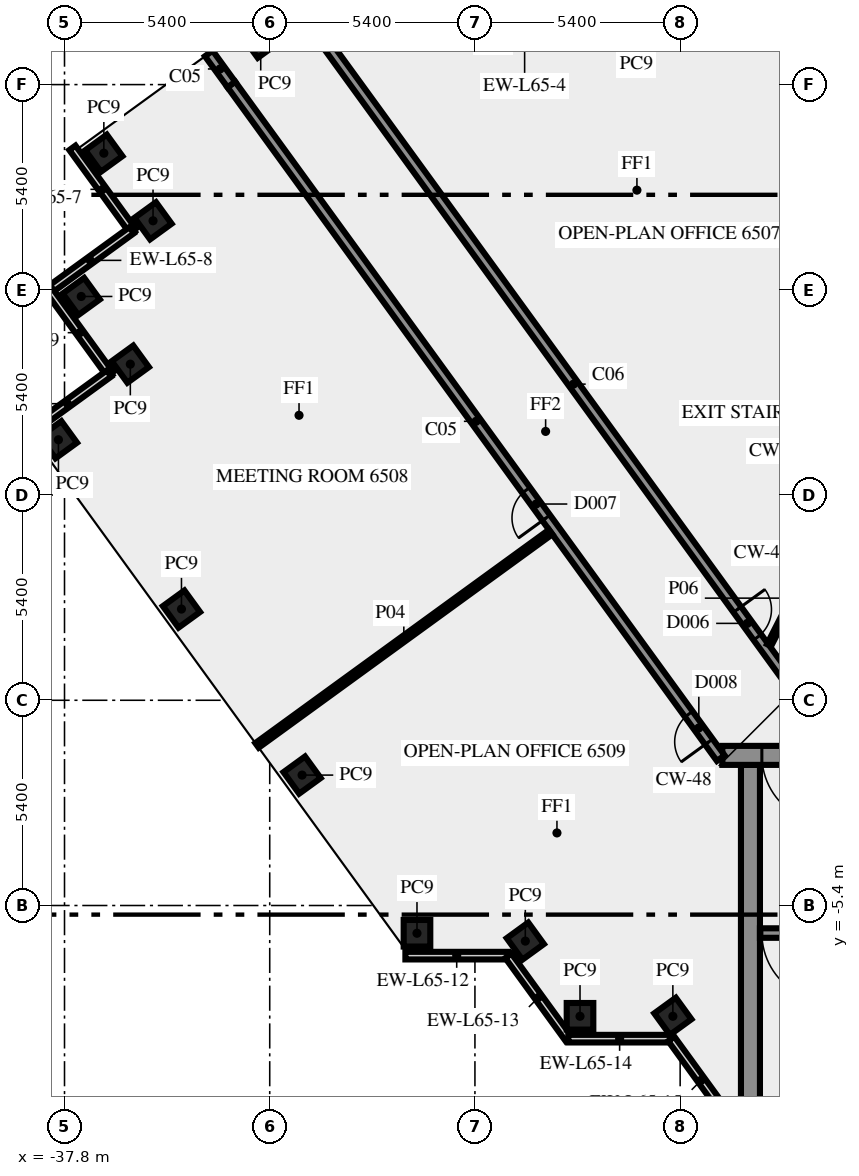
"""IFC4 building model, lengths in metres.
Left out: names, types, materials, properties, quantities, classifications, styles, units other than length and angle.
Written with IfcOpenShell. Run it as: python <this file> out.ifc"""

import sys

from ifc_helpers import new_model, si_unit, direction, frame, frame_2d, origin, origin_2d, place, context, subcontext, project, spatial, rectangle, extrude, element, fill, save


model = new_model("IFC4")
c1 = context("Model", 3, precision=1e-05, world=origin(), true_north=direction((0.0, 1.0)))
c2 = subcontext(c1, "Body", "Model", "MODEL_VIEW")
j1 = project(units=[si_unit("LENGTHUNIT", "METRE"), si_unit("PLANEANGLEUNIT", "RADIAN")], contexts=[c1])
p1 = place(None, origin())
s1 = spatial("IfcSite", under=j1, at=p1, CompositionType="ELEMENT")
p2 = place(p1, origin())
s2 = spatial("IfcBuilding", under=s1, at=p2, CompositionType="ELEMENT")
p3 = place(p2, frame((0.0, 0.0, 281.0)))
s3 = spatial("IfcBuildingStorey", under=s2, at=p3, CompositionType="ELEMENT", Elevation=281.0)
for number, where, z_axis, x_axis in (
    (1, (-32.637, 17.393, 0.0), (0.0, 0.0, 1.0), (-0.809, -0.588, 0.0)),
    (2, (-36.765, 14.395, 0.0), (0.0, 0.0, 1.0), (0.588, -0.809, 0.0)),
    (3, (-35.471, 12.616, 0.0), (0.0, 0.0, 1.0), (-0.809, -0.588, 0.0)),
    (4, (-37.36, 10.625, 0.0), (0.0, 0.0, 1.0), (0.588, -0.809, 0.0)),
    (5, (-36.068, 8.844, 0.0), (0.0, 0.0, 1.0), (0.588, -0.809, 0.0)),
    (6, (-37.96, 6.855, 0.0), (0.0, 0.0, 1.0), (0.588, -0.809, 0.0)),
    (7, (-34.722, 2.4, 0.0), (0.0, 0.0, 1.0), (0.588, -0.809, 0.0)),
    (8, (-31.548, -1.969, 0.0), (0.0, 0.0, 1.0), (0.588, -0.809, 0.0)),
    (9, (-28.525, -6.13, 0.0), (0.0, 0.0, 1.0), (1.0, 0.0, 0.0)),
    (10, (-25.674, -6.337, 0.0), (0.0, 0.0, 1.0), (0.588, -0.809, 0.0)),
    (11, (-24.235, -8.315, 0.0), (0.0, 0.0, 1.0), (1.0, 0.0, 0.0)),
    (12, (-21.792, -8.315, 0.0), (0.0, 0.0, 1.0), (0.588, -0.809, 0.0)),
):
    element("IfcColumn", number, at=place(p3, frame(where, z_axis=z_axis, x_axis=x_axis)), inside=s3, PredefinedType="COLUMN", context=c2, shape_type="SweptSolid", body=[
        extrude(rectangle(XDim=0.7, YDim=0.7, at=origin_2d()), origin(), (0.0, 0.0, 1.0), 3.65),
    ])
for number, where, z_axis, x_axis in (
    (13, (-37.592, 14.536, 0.0), (0.0, 0.0, 1.0), (0.588, -0.809, 0.0)),
    (14, (-36.032, 12.369, 0.0), (0.0, 0.0, 1.0), (-0.809, -0.588, 0.0)),
    (15, (-38.189, 10.765, 0.0), (0.0, 0.0, 1.0), (0.588, -0.809, 0.0)),
    (16, (-36.629, 8.597, 0.0), (0.0, 0.0, 1.0), (-0.809, -0.588, 0.0)),
    (17, (-28.83, -6.719, 0.0), (0.0, 0.0, 1.0), (1.0, 0.0, 0.0)),
):
    element("IfcWall", number, at=place(p3, frame(where, z_axis=z_axis, x_axis=x_axis)), inside=s3, PredefinedType="SOLIDWALL", context=c2, shape_type="SweptSolid", body=[
        extrude(rectangle(XDim=2.7, YDim=0.2, at=frame_2d((1.35, 0.0))), origin(), (0.0, 0.0, 1.0), 3.65),
    ])
p4 = place(p3, frame((-26.12, -6.724, 0.0), z_axis=(0.0, 0.0, 1.0), x_axis=(0.587720002413, -0.809064397168, 0.0)))
e18 = element("IfcWall", 18, at=p4, inside=s3, PredefinedType="SOLIDWALL", context=c2, shape_type="SweptSolid", body=[
    extrude(rectangle(XDim=2.7, YDim=0.2, at=frame_2d((1.35, 0.0))), origin(), (0.0, 0.0, 1.0), 3.65),
])
p5 = place(p3, frame((-24.543, -8.904, 0.0), z_axis=(0.0, 0.0, 1.0), x_axis=(1.0, 0.0, 0.0)))
e19 = element("IfcWall", 19, at=p5, inside=s3, PredefinedType="SOLIDWALL", context=c2, shape_type="SweptSolid", body=[
    extrude(rectangle(XDim=2.7, YDim=0.2, at=frame_2d((1.35, 0.0))), origin(), (0.0, 0.0, 1.0), 3.65),
])
p6 = place(p3, frame((-21.833, -8.909, 0.0), z_axis=(0.0, 0.0, 1.0), x_axis=(0.587766567315, -0.809030569476, 0.0)))
e20 = element("IfcWall", 20, at=p6, inside=s3, PredefinedType="SOLIDWALL", context=c2, shape_type="SweptSolid", body=[
    extrude(rectangle(XDim=2.688, YDim=0.2, at=frame_2d((1.344, 0.0))), origin(), (0.0, 0.0, 1.0), 3.65),
])
p7 = place(p3, frame((-19.75, -10.5, 0.0), z_axis=(0.0, 0.0, 1.0), x_axis=(0.0, 1.0, 0.0)))
e21 = element("IfcWall", 21, at=p7, inside=s3, PredefinedType="SHEAR", context=c2, shape_type="SweptSolid", body=[
    extrude(rectangle(XDim=8.8, YDim=0.5, at=frame_2d((4.4, 0.0))), origin(), (0.0, 0.0, 1.0), 3.65),
])
p8 = place(p3, frame((-11.45, -6.125, 0.0), z_axis=(0.0, 0.0, 1.0), x_axis=(-1.0, 0.0, 0.0)))
e22 = element("IfcWall", 22, at=p8, inside=s3, PredefinedType="SHEAR", context=c2, shape_type="SweptSolid", body=[
    extrude(rectangle(XDim=8.05, YDim=0.25, at=frame_2d((4.025, 0.0))), origin(), (0.0, 0.0, 1.0), 3.65),
])
p9 = place(p8, frame((6.2, 0.0, 0.0)))
e23 = element("IfcOpeningElement", 23, at=p9, cuts=e22, PredefinedType="OPENING", context=c2, shape_type="SweptSolid", body=[
    extrude(rectangle(XDim=1.8, YDim=2.1, at=frame_2d((0.9, 1.05))), frame((0.0, 0.135, 0.0), z_axis=(0.0, -1.0, 0.0), x_axis=(1.0, 0.0, 0.0)), (0.0, 0.0, 1.0), 0.27),
])
p10 = place(p3, frame((20.49, -1.45, 0.0), z_axis=(0.0, 0.0, 1.0), x_axis=(-1.0, 0.0, 0.0)))
e24 = element("IfcWall", 24, at=p10, inside=s3, PredefinedType="SHEAR", context=c2, shape_type="SweptSolid", body=[
    extrude(rectangle(XDim=40.98, YDim=0.5, at=frame_2d((20.49, 0.0))), origin(), (0.0, 0.0, 1.0), 3.65),
])
p11 = place(p10, frame((38.14, 0.0, 0.0)))
e25 = element("IfcOpeningElement", 25, at=p11, cuts=e24, PredefinedType="OPENING", context=c2, shape_type="SweptSolid", body=[
    extrude(rectangle(XDim=1.8, YDim=2.1, at=frame_2d((0.9, 1.05))), frame((0.0, 0.26, 0.0), z_axis=(0.0, -1.0, 0.0), x_axis=(1.0, 0.0, 0.0)), (0.0, 0.0, 1.0), 0.52),
])
p12 = place(p10, frame((36.728, 0.0, 0.0)))
e26 = element("IfcOpeningElement", 26, at=p12, cuts=e24, PredefinedType="OPENING", context=c2, shape_type="SweptSolid", body=[
    extrude(rectangle(XDim=0.8, YDim=2.1, at=frame_2d((0.4, 1.05))), frame((0.0, 0.26, 0.0), z_axis=(0.0, -1.0, 0.0), x_axis=(1.0, 0.0, 0.0)), (0.0, 0.0, 1.0), 0.52),
])
p13 = place(p10, frame((35.153, 0.0, 0.0)))
e27 = element("IfcOpeningElement", 27, at=p13, cuts=e24, PredefinedType="OPENING", context=c2, shape_type="SweptSolid", body=[
    extrude(rectangle(XDim=0.8, YDim=2.1, at=frame_2d((0.4, 1.05))), frame((0.0, 0.26, 0.0), z_axis=(0.0, -1.0, 0.0), x_axis=(1.0, 0.0, 0.0)), (0.0, 0.0, 1.0), 0.52),
])
p14 = place(p10, frame((32.94, 0.0, 0.0)))
e28 = element("IfcOpeningElement", 28, at=p14, cuts=e24, PredefinedType="OPENING", context=c2, shape_type="SweptSolid", body=[
    extrude(rectangle(XDim=0.9, YDim=2.1, at=frame_2d((0.45, 1.05))), frame((0.0, 0.26, 0.0), z_axis=(0.0, -1.0, 0.0), x_axis=(1.0, 0.0, 0.0)), (0.0, 0.0, 1.0), 0.52),
])
p15 = place(p10, frame((31.015, 0.0, 0.0)))
e29 = element("IfcOpeningElement", 29, at=p15, cuts=e24, PredefinedType="OPENING", context=c2, shape_type="SweptSolid", body=[
    extrude(rectangle(XDim=0.8, YDim=2.1, at=frame_2d((0.4, 1.05))), frame((0.0, 0.26, 0.0), z_axis=(0.0, -1.0, 0.0), x_axis=(1.0, 0.0, 0.0)), (0.0, 0.0, 1.0), 0.52),
])
p16 = place(p10, frame((24.765, 0.0, 0.0)))
e30 = element("IfcOpeningElement", 30, at=p16, cuts=e24, PredefinedType="OPENING", context=c2, shape_type="SweptSolid", body=[
    extrude(rectangle(XDim=0.8, YDim=2.1, at=frame_2d((0.4, 1.05))), frame((0.0, 0.26, 0.0), z_axis=(0.0, -1.0, 0.0), x_axis=(1.0, 0.0, 0.0)), (0.0, 0.0, 1.0), 0.52),
])
p17 = place(p10, frame((19.59, 0.0, 0.0)))
e31 = element("IfcOpeningElement", 31, at=p17, cuts=e24, PredefinedType="OPENING", context=c2, shape_type="SweptSolid", body=[
    extrude(rectangle(XDim=2.0, YDim=2.1, at=frame_2d((1.0, 1.05))), frame((0.0, 0.26, 0.0), z_axis=(0.0, -1.0, 0.0), x_axis=(1.0, 0.0, 0.0)), (0.0, 0.0, 1.0), 0.52),
])
p18 = place(p10, frame((13.202, 0.0, 0.0)))
e32 = element("IfcOpeningElement", 32, at=p18, cuts=e24, PredefinedType="OPENING", context=c2, shape_type="SweptSolid", body=[
    extrude(rectangle(XDim=0.9, YDim=2.1, at=frame_2d((0.45, 1.05))), frame((0.0, 0.26, 0.0), z_axis=(0.0, -1.0, 0.0), x_axis=(1.0, 0.0, 0.0)), (0.0, 0.0, 1.0), 0.52),
])
p19 = place(p10, frame((9.478, 0.0, 0.0)))
e33 = element("IfcOpeningElement", 33, at=p19, cuts=e24, PredefinedType="OPENING", context=c2, shape_type="SweptSolid", body=[
    extrude(rectangle(XDim=0.9, YDim=2.1, at=frame_2d((0.45, 1.05))), frame((0.0, 0.26, 0.0), z_axis=(0.0, -1.0, 0.0), x_axis=(1.0, 0.0, 0.0)), (0.0, 0.0, 1.0), 0.52),
])
p20 = place(p10, frame((7.14, 0.0, 0.0)))
e34 = element("IfcOpeningElement", 34, at=p20, cuts=e24, PredefinedType="OPENING", context=c2, shape_type="SweptSolid", body=[
    extrude(rectangle(XDim=0.9, YDim=2.1, at=frame_2d((0.45, 1.05))), frame((0.0, 0.26, 0.0), z_axis=(0.0, -1.0, 0.0), x_axis=(1.0, 0.0, 0.0)), (0.0, 0.0, 1.0), 0.52),
])
p21 = place(p10, frame((4.19, 0.0, 0.0)))
e35 = element("IfcOpeningElement", 35, at=p21, cuts=e24, PredefinedType="OPENING", context=c2, shape_type="SweptSolid", body=[
    extrude(rectangle(XDim=0.9, YDim=2.1, at=frame_2d((0.45, 1.05))), frame((0.0, 0.26, 0.0), z_axis=(0.0, -1.0, 0.0), x_axis=(1.0, 0.0, 0.0)), (0.0, 0.0, 1.0), 0.52),
])
p22 = place(p10, frame((1.04, 0.0, 0.0)))
e36 = element("IfcOpeningElement", 36, at=p22, cuts=e24, PredefinedType="OPENING", context=c2, shape_type="SweptSolid", body=[
    extrude(rectangle(XDim=1.8, YDim=2.1, at=frame_2d((0.9, 1.05))), frame((0.0, 0.26, 0.0), z_axis=(0.0, -1.0, 0.0), x_axis=(1.0, 0.0, 0.0)), (0.0, 0.0, 1.0), 0.52),
])
p23 = place(p3, frame((-20.531, -1.523, 0.0), z_axis=(0.0, 0.0, 1.0), x_axis=(-0.587786711753, 0.809015934013, 0.0)))
e37 = element("IfcWall", 37, at=p23, inside=s3, PredefinedType="SOLIDWALL", context=c2, shape_type="SweptSolid", body=[
    extrude(rectangle(XDim=21.911, YDim=0.25, at=frame_2d((10.956, 0.0))), origin(), (0.0, 0.0, 1.0), 3.65),
])
p24 = place(p23, frame((0.533, 0.0, 0.0)))
e38 = element("IfcOpeningElement", 38, at=p24, cuts=e37, PredefinedType="OPENING", context=c2, shape_type="SweptSolid", body=[
    extrude(rectangle(XDim=0.9, YDim=2.1, at=frame_2d((0.45, 1.05))), frame((0.0, 0.135, 0.0), z_axis=(0.0, -1.0, 0.0), x_axis=(1.0, 0.0, 0.0)), (0.0, 0.0, 1.0), 0.27),
])
p25 = place(p23, frame((7.816, 0.0, 0.0)))
e39 = element("IfcOpeningElement", 39, at=p25, cuts=e37, PredefinedType="OPENING", context=c2, shape_type="SweptSolid", body=[
    extrude(rectangle(XDim=0.9, YDim=2.1, at=frame_2d((0.45, 1.05))), frame((0.0, 0.135, 0.0), z_axis=(0.0, -1.0, 0.0), x_axis=(1.0, 0.0, 0.0)), (0.0, 0.0, 1.0), 0.27),
])
p26 = place(p3, frame((-31.267, 17.762, 0.0), z_axis=(0.0, 0.0, 1.0), x_axis=(0.587787966774, -0.809015022181, 0.0)))
e40 = element("IfcWall", 40, at=p26, inside=s3, PredefinedType="SOLIDWALL", context=c2, shape_type="SweptSolid", body=[
    extrude(rectangle(XDim=23.345, YDim=0.25, at=frame_2d((11.672, 0.0))), origin(), (0.0, 0.0, 1.0), 3.65),
])
p27 = place(p26, frame((19.004, 0.0, 0.0)))
e41 = element("IfcOpeningElement", 41, at=p27, cuts=e40, PredefinedType="OPENING", context=c2, shape_type="SweptSolid", body=[
    extrude(rectangle(XDim=0.9, YDim=2.1, at=frame_2d((0.45, 1.05))), frame((0.0, 0.135, 0.0), z_axis=(0.0, -1.0, 0.0), x_axis=(1.0, 0.0, 0.0)), (0.0, 0.0, 1.0), 0.27),
])
p28 = place(p3, frame((-25.008, 4.427, 0.0), z_axis=(0.0, 0.0, 1.0), x_axis=(-0.808994684961, -0.587815957341, 0.0)))
e42 = element("IfcWall", 42, at=p28, inside=s3, PredefinedType="PARTITIONING", context=c2, shape_type="SweptSolid", body=[
    extrude(rectangle(XDim=9.55, YDim=0.15, at=frame_2d((4.775, 0.0))), origin(), (0.0, 0.0, 1.0), 2.95),
])
p29 = place(p3, frame((-19.261, 1.45, 0.0), z_axis=(0.0, 0.0, 1.0), x_axis=(0.453950796792, 0.891026752736, 0.0)))
e43 = element("IfcWall", 43, at=p29, inside=s3, PredefinedType="PARTITIONING", context=c2, shape_type="SweptSolid", body=[
    extrude(rectangle(XDim=2.778, YDim=0.12, at=frame_2d((1.389, 0.0))), origin(), (0.0, 0.0, 1.0), 3.65),
])
p30 = place(p3, frame((-33.41, 16.203, 0.0), z_axis=(0.0, 0.0, 1.0), x_axis=(-0.587696850957, 0.809081214326, 0.0)))
e44 = element("IfcWall", 44, at=p30, inside=s3, PredefinedType="SOLIDWALL", context=c2, shape_type="SweptSolid", body=[
    extrude(rectangle(XDim=1.009, YDim=0.25, at=frame_2d((0.504, 0.0))), origin(), (0.0, 0.0, 1.0), 2.95),
])
p31 = place(p9, origin())
e45 = element("IfcDoor", 45, at=p31, inside=s3, OperationType="DOUBLE_DOOR_SINGLE_SWING", PredefinedType="DOOR", context=c2, shape_type="SweptSolid", body=[
    extrude(rectangle(XDim=1.8, YDim=2.1, at=frame_2d((0.9, 1.05))), frame((0.0, 0.025, 0.0), z_axis=(0.0, -1.0, 0.0), x_axis=(1.0, 0.0, 0.0)), (0.0, 0.0, 1.0), 0.05),
])
fill(e23, e45)
p32 = place(p11, origin())
e46 = element("IfcDoor", 46, at=p32, inside=s3, OperationType="DOUBLE_DOOR_SINGLE_SWING", PredefinedType="DOOR", context=c2, shape_type="SweptSolid", body=[
    extrude(rectangle(XDim=1.8, YDim=2.1, at=frame_2d((0.9, 1.05))), frame((0.0, 0.025, 0.0), z_axis=(0.0, -1.0, 0.0), x_axis=(1.0, 0.0, 0.0)), (0.0, 0.0, 1.0), 0.05),
])
fill(e25, e46)
p33 = place(p27, origin())
e47 = element("IfcDoor", 47, at=p33, inside=s3, OperationType="SINGLE_SWING_RIGHT", PredefinedType="DOOR", context=c2, shape_type="SweptSolid", body=[
    extrude(rectangle(XDim=0.9, YDim=2.1, at=frame_2d((0.45, 1.05))), frame((0.0, 0.025, 0.0), z_axis=(0.0, -1.0, 0.0), x_axis=(1.0, 0.0, 0.0)), (0.0, 0.0, 1.0), 0.05),
])
fill(e41, e47)
p34 = place(p24, origin())
e48 = element("IfcDoor", 48, at=p34, inside=s3, OperationType="SINGLE_SWING_LEFT", PredefinedType="DOOR", context=c2, shape_type="SweptSolid", body=[
    extrude(rectangle(XDim=0.9, YDim=2.1, at=frame_2d((0.45, 1.05))), frame((0.0, 0.025, 0.0), z_axis=(0.0, -1.0, 0.0), x_axis=(1.0, 0.0, 0.0)), (0.0, 0.0, 1.0), 0.05),
])
fill(e38, e48)
p35 = place(p25, origin())
e49 = element("IfcDoor", 49, at=p35, inside=s3, OperationType="SINGLE_SWING_LEFT", PredefinedType="DOOR", context=c2, shape_type="SweptSolid", body=[
    extrude(rectangle(XDim=0.9, YDim=2.1, at=frame_2d((0.45, 1.05))), frame((0.0, 0.025, 0.0), z_axis=(0.0, -1.0, 0.0), x_axis=(1.0, 0.0, 0.0)), (0.0, 0.0, 1.0), 0.05),
])
fill(e39, e49)
save(model, sys.argv[1])
